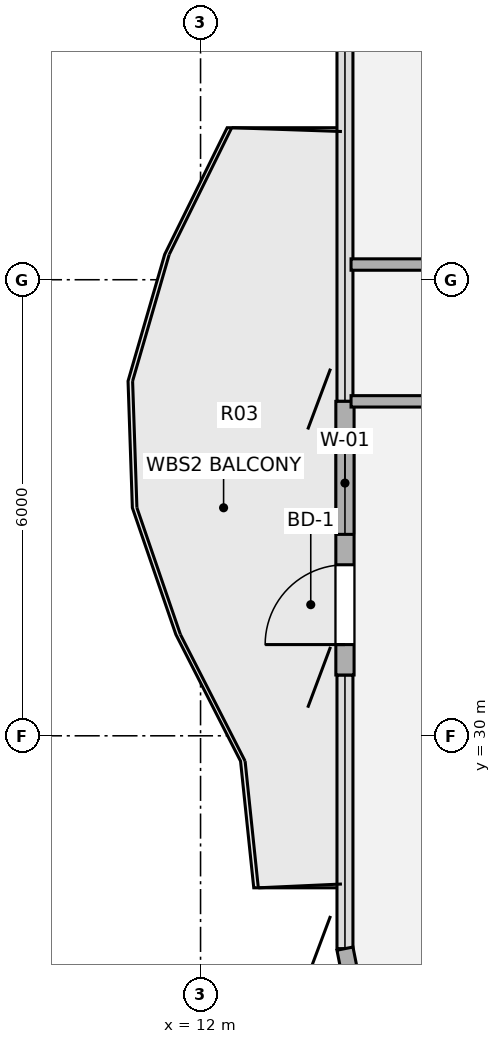
"""IFC4 building model, lengths in metres.
Left out: names, types, materials, properties, quantities, classifications, styles, units other than length and angle.
Written with IfcOpenShell. Run it as: python <this file> out.ifc"""

import sys

from ifc_helpers import new_model, si_unit, direction, frame, frame_2d, origin, origin_2d, place, context, subcontext, project, spatial, rectangle, extrude, source, transform, mapped, element, fill, save


model = new_model("IFC4")
c1 = context("Model", 3, precision=1e-05, world=origin(), true_north=direction((0.0, 1.0)))
c2 = subcontext(c1, "Body", "Model", "MODEL_VIEW")
j1 = project(units=[si_unit("LENGTHUNIT", "METRE"), si_unit("PLANEANGLEUNIT", "RADIAN")], contexts=[c1])
p1 = place(None, origin())
s1 = spatial("IfcSite", under=j1, at=p1, CompositionType="ELEMENT")
p2 = place(p1, origin())
s2 = spatial("IfcBuilding", under=s1, at=p2, CompositionType="ELEMENT")
p3 = place(p2, frame((0.0, 0.0, 123.84)))
s3 = spatial("IfcBuildingStorey", under=s2, at=p3, CompositionType="ELEMENT", Elevation=123.84)
p4 = place(p3, frame((14.144, 25.975, 0.0), z_axis=(0.0, 0.0, 1.0), x_axis=(-0.195138390419, 0.980775717779, 0.0)))
e1 = element("IfcWall", 1, at=p4, inside=s3, PredefinedType="SOLIDWALL", context=c2, shape_type="SweptSolid", body=[
    extrude(rectangle(XDim=1.249, YDim=0.215, at=frame_2d((0.624, 0.0))), origin(), (0.0, 0.0, 1.0), 3.53),
])
p5 = place(p3, frame((13.9, 30.8, 0.0), z_axis=(0.0, 0.0, 1.0), x_axis=(0.0, 1.0, 0.0)))
e2 = element("IfcWall", 2, at=p5, inside=s3, PredefinedType="SOLIDWALL", context=c2, shape_type="SweptSolid", body=[
    extrude(rectangle(XDim=3.6, YDim=0.24, at=frame_2d((1.8, 0.0))), origin(), (0.0, 0.0, 1.0), 3.53),
])
p6 = place(p5, frame((0.4, 0.0, 0.0)))
e3 = element("IfcOpeningElement", 3, at=p6, cuts=e2, PredefinedType="OPENING", context=c2, shape_type="SweptSolid", body=[
    extrude(rectangle(XDim=1.05, YDim=2.15, at=origin_2d()), frame((0.525, 0.13, 1.075), z_axis=(0.0, -1.0, 0.0), x_axis=(1.0, 0.0, 0.0)), (0.0, 0.0, 1.0), 0.26),
])
p7 = place(p5, frame((1.85, 0.0, 0.85)))
e4 = element("IfcOpeningElement", 4, at=p7, cuts=e2, PredefinedType="OPENING", context=c2, shape_type="SweptSolid", body=[
    extrude(rectangle(XDim=1.35, YDim=1.35, at=origin_2d()), frame((0.675, 0.13, 0.675), z_axis=(0.0, -1.0, 0.0), x_axis=(1.0, 0.0, 0.0)), (0.0, 0.0, 1.0), 0.26),
])
p8 = place(p3, frame((13.98, 34.4, 0.0), z_axis=(0.0, 0.0, 1.0), x_axis=(1.0, 0.0, 0.0)))
e5 = element("IfcWall", 5, at=p8, inside=s3, PredefinedType="PARTITIONING", context=c2, shape_type="SweptSolid", body=[
    extrude(rectangle(XDim=8.42, YDim=0.15, at=frame_2d((4.21, 0.0))), origin(), (0.0, 0.0, 1.0), 2.982),
])
p9 = place(p8, frame((5.995, 0.0, 0.0)))
e6 = element("IfcOpeningElement", 6, at=p9, cuts=e5, PredefinedType="OPENING", context=c2, shape_type="SweptSolid", body=[
    extrude(rectangle(XDim=1.05, YDim=2.1, at=origin_2d()), frame((0.525, 0.085, 1.05), z_axis=(0.0, -1.0, 0.0), x_axis=(1.0, 0.0, 0.0)), (0.0, 0.0, 1.0), 0.17),
])
p10 = place(p3, frame((13.98, 36.2, 0.0), z_axis=(0.0, 0.0, 1.0), x_axis=(1.0, 0.0, 0.0)))
e7 = element("IfcWall", 7, at=p10, inside=s3, PredefinedType="PARTITIONING", context=c2, shape_type="SweptSolid", body=[
    extrude(rectangle(XDim=8.42, YDim=0.15, at=frame_2d((4.21, 0.0))), origin(), (0.0, 0.0, 1.0), 2.982),
])
p11 = place(p10, frame((5.995, 0.0, 0.0)))
e8 = element("IfcOpeningElement", 8, at=p11, cuts=e7, PredefinedType="OPENING", context=c2, shape_type="SweptSolid", body=[
    extrude(rectangle(XDim=1.05, YDim=2.1, at=origin_2d()), frame((0.525, 0.085, 1.05), z_axis=(0.0, -1.0, 0.0), x_axis=(1.0, 0.0, 0.0)), (0.0, 0.0, 1.0), 0.17),
])
m1 = source(origin(), c2, "Body", "SweptSolid", [
    extrude(rectangle(XDim=1.05, YDim=2.15, at=origin_2d()), frame((0.525, 0.025, 1.075), z_axis=(0.0, -1.0, 0.0), x_axis=(1.0, 0.0, 0.0)), (0.0, 0.0, 1.0), 0.05),
])
p12 = place(p6, origin())
e9 = element("IfcDoor", 9, at=p12, inside=s3, OperationType="SINGLE_SWING_LEFT", PredefinedType="DOOR", context=c2, shape_type="MappedRepresentation", body=[
    mapped(m1, transform((0.0, 0.0, 0.0), x_axis=(1.0, 0.0, 0.0), y_axis=(0.0, 1.0, 0.0), z_axis=(0.0, 0.0, 1.0), scale=1.0)),
])
fill(e3, e9)
m2 = source(origin(), c2, "Body", "SweptSolid", [
    extrude(rectangle(XDim=1.35, YDim=1.35, at=origin_2d()), frame((0.675, 0.03, 0.675), z_axis=(0.0, -1.0, 0.0), x_axis=(1.0, 0.0, 0.0)), (0.0, 0.0, 1.0), 0.06),
])
p13 = place(p7, origin())
e10 = element("IfcWindow", 10, at=p13, inside=s3, PartitioningType="SINGLE_PANEL", PredefinedType="WINDOW", context=c2, shape_type="MappedRepresentation", body=[
    mapped(m2, transform((0.0, 0.0, 0.0), x_axis=(1.0, 0.0, 0.0), y_axis=(0.0, 1.0, 0.0), z_axis=(0.0, 0.0, 1.0), scale=1.0)),
])
fill(e4, e10)
save(model, sys.argv[1])
